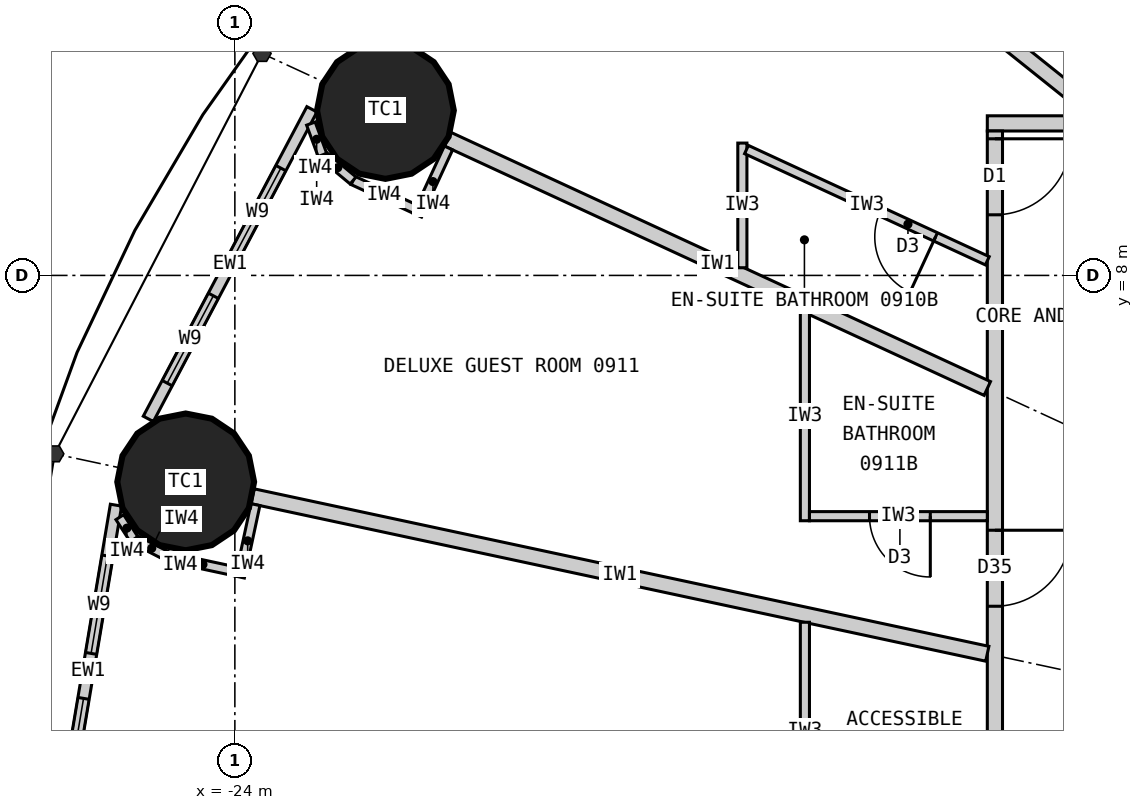
"""IFC4 building model, lengths in metres.
Left out: names, types, materials, properties, quantities, classifications, styles, units other than length and angle.
Written with IfcOpenShell. Run it as: python <this file> out.ifc"""

import sys

from ifc_helpers import new_model, si_unit, direction, frame, frame_2d, origin, origin_2d, place, context, subcontext, project, spatial, rectangle, circle, extrude, element, fill, save


model = new_model("IFC4")
c1 = context("Model", 3, precision=1e-05, world=origin(), true_north=direction((0.0, 1.0)))
c2 = subcontext(c1, "Body", "Model", "MODEL_VIEW")
j1 = project(units=[si_unit("LENGTHUNIT", "METRE"), si_unit("PLANEANGLEUNIT", "RADIAN")], contexts=[c1])
p1 = place(None, origin())
s1 = spatial("IfcSite", under=j1, at=p1, CompositionType="ELEMENT")
p2 = place(p1, origin())
s2 = spatial("IfcBuilding", under=s1, at=p2, CompositionType="ELEMENT")
p3 = place(p2, frame((0.0, 0.0, 42.6)))
s3 = spatial("IfcBuildingStorey", under=s2, at=p3, CompositionType="ELEMENT", Elevation=42.6)
for number, where, z_axis, x_axis in (
    (1, (-22.019, 10.17, 0.0), (0.0, 0.0, 1.0), (1.0, 0.0, 0.0)),
    (2, (-24.647, 5.283, 0.0), (0.0, 0.0, 1.0), (1.0, 0.0, 0.0)),
):
    element("IfcColumn", number, at=place(p3, frame(where, z_axis=z_axis, x_axis=x_axis)), inside=s3, PredefinedType="COLUMN", context=c2, shape_type="SweptSolid", body=[
        extrude(circle(Radius=0.9, at=origin_2d()), origin(), (0.0, 0.0, 1.0), 3.3),
    ])
p4 = place(p3, frame((-22.986, 10.185, 0.0), z_axis=(0.0, 0.0, 1.0), x_axis=(-0.467303182954, -0.884097129959, 0.0)))
e3 = element("IfcWall", 3, at=p4, inside=s3, PredefinedType="ELEMENTEDWALL", context=c2, shape_type="SweptSolid", body=[
    extrude(rectangle(XDim=4.606, YDim=0.15, at=frame_2d((2.303, 0.0))), origin(), (0.0, 0.0, 1.0), 3.05),
])
p5 = place(p4, frame((0.875, 0.0, 0.9)))
e4 = element("IfcOpeningElement", 4, at=p5, cuts=e3, PredefinedType="OPENING", context=c2, shape_type="SweptSolid", body=[
    extrude(rectangle(XDim=1.3, YDim=1.9, at=frame_2d((0.65, 0.95))), frame((0.0, 0.085, 0.0), z_axis=(0.0, -1.0, 0.0), x_axis=(1.0, 0.0, 0.0)), (0.0, 0.0, 1.0), 0.17),
])
p6 = place(p4, frame((2.775, 0.0, 0.9)))
e5 = element("IfcOpeningElement", 5, at=p6, cuts=e3, PredefinedType="OPENING", context=c2, shape_type="SweptSolid", body=[
    extrude(rectangle(XDim=1.3, YDim=1.9, at=frame_2d((0.65, 0.95))), frame((0.0, 0.085, 0.0), z_axis=(0.0, -1.0, 0.0), x_axis=(1.0, 0.0, 0.0)), (0.0, 0.0, 1.0), 0.17),
])
p7 = place(p3, frame((-25.564, 4.978, 0.0), z_axis=(0.0, 0.0, 1.0), x_axis=(-0.165641751141, -0.986185991727, 0.0)))
e6 = element("IfcWall", 6, at=p7, inside=s3, PredefinedType="ELEMENTEDWALL", context=c2, shape_type="SweptSolid", body=[
    extrude(rectangle(XDim=4.428, YDim=0.15, at=frame_2d((2.214, 0.0))), origin(), (0.0, 0.0, 1.0), 3.05),
])
p8 = place(p7, frame((0.678, 0.0, 0.9)))
e7 = element("IfcOpeningElement", 7, at=p8, cuts=e6, PredefinedType="OPENING", context=c2, shape_type="SweptSolid", body=[
    extrude(rectangle(XDim=1.3, YDim=1.9, at=frame_2d((0.65, 0.95))), frame((0.0, 0.085, 0.0), z_axis=(0.0, -1.0, 0.0), x_axis=(1.0, 0.0, 0.0)), (0.0, 0.0, 1.0), 0.17),
])
p9 = place(p7, frame((2.578, 0.0, 0.9)))
e8 = element("IfcOpeningElement", 8, at=p9, cuts=e6, PredefinedType="OPENING", context=c2, shape_type="SweptSolid", body=[
    extrude(rectangle(XDim=1.3, YDim=1.9, at=frame_2d((0.65, 0.95))), frame((0.0, 0.085, 0.0), z_axis=(0.0, -1.0, 0.0), x_axis=(1.0, 0.0, 0.0)), (0.0, 0.0, 1.0), 0.17),
])
p10 = place(p3, frame((-14.1, 10.0, 0.0), z_axis=(0.0, 0.0, 1.0), x_axis=(1.0, 0.0, 0.0)))
e9 = element("IfcWall", 9, at=p10, inside=s3, PredefinedType="PARTITIONING", context=c2, shape_type="SweptSolid", body=[
    extrude(rectangle(XDim=28.2, YDim=0.2, at=frame_2d((14.1, 0.0))), origin(), (0.0, 0.0, 1.0), 3.05),
])
p11 = place(p10, frame((23.477, 0.0, 0.0)))
e10 = element("IfcOpeningElement", 10, at=p11, cuts=e9, PredefinedType="OPENING", context=c2, shape_type="SweptSolid", body=[
    extrude(rectangle(XDim=1.0, YDim=2.2, at=frame_2d((0.5, 1.1))), frame((0.0, 0.11, 0.0), z_axis=(0.0, -1.0, 0.0), x_axis=(1.0, 0.0, 0.0)), (0.0, 0.0, 1.0), 0.22),
])
p12 = place(p10, frame((18.529, 0.0, 0.0)))
e11 = element("IfcOpeningElement", 11, at=p12, cuts=e9, PredefinedType="OPENING", context=c2, shape_type="SweptSolid", body=[
    extrude(rectangle(XDim=1.0, YDim=2.2, at=frame_2d((0.5, 1.1))), frame((0.0, 0.11, 0.0), z_axis=(0.0, -1.0, 0.0), x_axis=(1.0, 0.0, 0.0)), (0.0, 0.0, 1.0), 0.22),
])
p13 = place(p10, frame((14.623, 0.0, 0.0)))
e12 = element("IfcOpeningElement", 12, at=p13, cuts=e9, PredefinedType="OPENING", context=c2, shape_type="SweptSolid", body=[
    extrude(rectangle(XDim=1.0, YDim=2.2, at=frame_2d((0.5, 1.1))), frame((0.0, 0.11, 0.0), z_axis=(0.0, -1.0, 0.0), x_axis=(1.0, 0.0, 0.0)), (0.0, 0.0, 1.0), 0.22),
])
p14 = place(p10, frame((11.252, 0.0, 0.0)))
e13 = element("IfcOpeningElement", 13, at=p14, cuts=e9, PredefinedType="OPENING", context=c2, shape_type="SweptSolid", body=[
    extrude(rectangle(XDim=1.0, YDim=2.1, at=frame_2d((0.5, 1.05))), frame((0.0, 0.11, 0.0), z_axis=(0.0, -1.0, 0.0), x_axis=(1.0, 0.0, 0.0)), (0.0, 0.0, 1.0), 0.22),
])
p15 = place(p10, frame((8.671, 0.0, 0.0)))
e14 = element("IfcOpeningElement", 14, at=p15, cuts=e9, PredefinedType="OPENING", context=c2, shape_type="SweptSolid", body=[
    extrude(rectangle(XDim=1.0, YDim=2.2, at=frame_2d((0.5, 1.1))), frame((0.0, 0.11, 0.0), z_axis=(0.0, -1.0, 0.0), x_axis=(1.0, 0.0, 0.0)), (0.0, 0.0, 1.0), 0.22),
])
p16 = place(p10, frame((1.616, 0.0, 0.0)))
e15 = element("IfcOpeningElement", 15, at=p16, cuts=e9, PredefinedType="OPENING", context=c2, shape_type="SweptSolid", body=[
    extrude(rectangle(XDim=1.0, YDim=2.2, at=frame_2d((0.5, 1.1))), frame((0.0, 0.11, 0.0), z_axis=(0.0, -1.0, 0.0), x_axis=(1.0, 0.0, 0.0)), (0.0, 0.0, 1.0), 0.22),
])
p17 = place(p3, frame((-14.0, 9.9, 0.0), z_axis=(0.0, 0.0, 1.0), x_axis=(0.0, -1.0, 0.0)))
e16 = element("IfcWall", 16, at=p17, inside=s3, PredefinedType="PARTITIONING", context=c2, shape_type="SweptSolid", body=[
    extrude(rectangle(XDim=19.8, YDim=0.2, at=frame_2d((9.9, 0.0))), origin(), (0.0, 0.0, 1.0), 3.05),
])
p18 = place(p17, frame((0.103, 0.0, 0.0)))
e17 = element("IfcOpeningElement", 17, at=p18, cuts=e16, PredefinedType="OPENING", context=c2, shape_type="SweptSolid", body=[
    extrude(rectangle(XDim=1.0, YDim=2.2, at=frame_2d((0.5, 1.1))), frame((0.0, 0.11, 0.0), z_axis=(0.0, -1.0, 0.0), x_axis=(1.0, 0.0, 0.0)), (0.0, 0.0, 1.0), 0.22),
])
p19 = place(p17, frame((5.252, 0.0, 0.0)))
e18 = element("IfcOpeningElement", 18, at=p19, cuts=e16, PredefinedType="OPENING", context=c2, shape_type="SweptSolid", body=[
    extrude(rectangle(XDim=1.0, YDim=2.0, at=frame_2d((0.5, 1.0))), frame((0.0, 0.11, 0.0), z_axis=(0.0, -1.0, 0.0), x_axis=(1.0, 0.0, 0.0)), (0.0, 0.0, 1.0), 0.22),
])
p20 = place(p17, frame((10.117, 0.0, 0.0)))
e19 = element("IfcOpeningElement", 19, at=p20, cuts=e16, PredefinedType="OPENING", context=c2, shape_type="SweptSolid", body=[
    extrude(rectangle(XDim=1.0, YDim=2.2, at=frame_2d((0.5, 1.1))), frame((0.0, 0.11, 0.0), z_axis=(0.0, -1.0, 0.0), x_axis=(1.0, 0.0, 0.0)), (0.0, 0.0, 1.0), 0.22),
])
p21 = place(p17, frame((13.247, 0.0, 0.0)))
e20 = element("IfcOpeningElement", 20, at=p21, cuts=e16, PredefinedType="OPENING", context=c2, shape_type="SweptSolid", body=[
    extrude(rectangle(XDim=1.0, YDim=2.0, at=frame_2d((0.5, 1.0))), frame((0.0, 0.11, 0.0), z_axis=(0.0, -1.0, 0.0), x_axis=(1.0, 0.0, 0.0)), (0.0, 0.0, 1.0), 0.22),
])
p22 = place(p17, frame((15.679, 0.0, 0.0)))
e21 = element("IfcOpeningElement", 21, at=p22, cuts=e16, PredefinedType="OPENING", context=c2, shape_type="SweptSolid", body=[
    extrude(rectangle(XDim=1.0, YDim=2.2, at=frame_2d((0.5, 1.1))), frame((0.0, 0.11, 0.0), z_axis=(0.0, -1.0, 0.0), x_axis=(1.0, 0.0, 0.0)), (0.0, 0.0, 1.0), 0.22),
])
p23 = place(p3, frame((-12.625, 10.1, 0.0), z_axis=(0.0, 0.0, 1.0), x_axis=(-0.780872884676, 0.624689953479, 0.0)))
e22 = element("IfcWall", 22, at=p23, inside=s3, PredefinedType="PARTITIONING", context=c2, shape_type="SweptSolid", body=[
    extrude(rectangle(XDim=5.845, YDim=0.2, at=frame_2d((2.922, 0.0))), origin(), (0.0, 0.0, 1.0), 2.15),
])
p24 = place(p3, frame((-14.1, 6.512, 0.0), z_axis=(0.0, 0.0, 1.0), x_axis=(-0.907842433118, 0.41931147925, 0.0)))
e23 = element("IfcWall", 23, at=p24, inside=s3, PredefinedType="PARTITIONING", context=c2, shape_type="SweptSolid", body=[
    extrude(rectangle(XDim=7.823, YDim=0.2, at=frame_2d((3.912, 0.0))), origin(), (0.0, 0.0, 1.0), 2.15),
])
p25 = place(p3, frame((-14.1, 3.022, 0.0), z_axis=(0.0, 0.0, 1.0), x_axis=(-0.977786510688, 0.209603290805, 0.0)))
e24 = element("IfcWall", 24, at=p25, inside=s3, PredefinedType="PARTITIONING", context=c2, shape_type="SweptSolid", body=[
    extrude(rectangle(XDim=9.887, YDim=0.2, at=frame_2d((4.943, 0.0))), origin(), (0.0, 0.0, 1.0), 2.05),
])
p26 = place(p3, frame((-17.323, 8.101, 0.0), z_axis=(0.0, 0.0, 1.0), x_axis=(0.0, 1.0, 0.0)))
e25 = element("IfcWall", 25, at=p26, inside=s3, PredefinedType="PARTITIONING", context=c2, shape_type="SweptSolid", body=[
    extrude(rectangle(XDim=1.64, YDim=0.12, at=frame_2d((0.82, 0.0))), origin(), (0.0, 0.0, 1.0), 3.05),
])
p27 = place(p3, frame((-14.1, 8.193, 0.0), z_axis=(0.0, 0.0, 1.0), x_axis=(-0.907836493557, 0.419324338628, 0.0)))
e26 = element("IfcWall", 26, at=p27, inside=s3, PredefinedType="PARTITIONING", context=c2, shape_type="SweptSolid", body=[
    extrude(rectangle(XDim=3.49, YDim=0.12, at=frame_2d((1.745, 0.0))), origin(), (0.0, 0.0, 1.0), 3.05),
])
p28 = place(p27, frame((0.75, 0.0, 0.0)))
e27 = element("IfcOpeningElement", 27, at=p28, cuts=e26, PredefinedType="OPENING", context=c2, shape_type="SweptSolid", body=[
    extrude(rectangle(XDim=0.8, YDim=2.1, at=frame_2d((0.4, 1.05))), frame((0.0, 0.07, 0.0), z_axis=(0.0, -1.0, 0.0), x_axis=(1.0, 0.0, 0.0)), (0.0, 0.0, 1.0), 0.14),
])
p29 = place(p3, frame((-16.5, 7.521, 0.0), z_axis=(0.0, 0.0, 1.0), x_axis=(0.0, -1.0, 0.0)))
e28 = element("IfcWall", 28, at=p29, inside=s3, PredefinedType="PARTITIONING", context=c2, shape_type="SweptSolid", body=[
    extrude(rectangle(XDim=2.749, YDim=0.12, at=frame_2d((1.374, 0.0))), origin(), (0.0, 0.0, 1.0), 3.05),
])
p30 = place(p3, frame((-14.1, 4.833, 0.0), z_axis=(0.0, 0.0, 1.0), x_axis=(-1.0, 0.0, 0.0)))
e29 = element("IfcWall", 29, at=p30, inside=s3, PredefinedType="PARTITIONING", context=c2, shape_type="SweptSolid", body=[
    extrude(rectangle(XDim=2.34, YDim=0.12, at=frame_2d((1.17, 0.0))), origin(), (0.0, 0.0, 1.0), 3.05),
])
p31 = place(p30, frame((0.75, 0.0, 0.0)))
e30 = element("IfcOpeningElement", 30, at=p31, cuts=e29, PredefinedType="OPENING", context=c2, shape_type="SweptSolid", body=[
    extrude(rectangle(XDim=0.8, YDim=2.1, at=frame_2d((0.4, 1.05))), frame((0.0, 0.07, 0.0), z_axis=(0.0, -1.0, 0.0), x_axis=(1.0, 0.0, 0.0)), (0.0, 0.0, 1.0), 0.14),
])
p32 = place(p3, frame((-16.5, 3.437, 0.0), z_axis=(0.0, 0.0, 1.0), x_axis=(0.0, -1.0, 0.0)))
e31 = element("IfcWall", 31, at=p32, inside=s3, PredefinedType="PARTITIONING", context=c2, shape_type="SweptSolid", body=[
    extrude(rectangle(XDim=2.854, YDim=0.12, at=frame_2d((1.427, 0.0))), origin(), (0.0, 0.0, 1.0), 3.05),
])
p33 = place(p3, frame((-21.189, 9.677, 0.0), z_axis=(0.0, 0.0, 1.0), x_axis=(-0.419344098106, -0.907827366509, 0.0)))
e32 = element("IfcWall", 32, at=p33, inside=s3, PredefinedType="PARTITIONING", context=c2, shape_type="SweptSolid", body=[
    extrude(rectangle(XDim=0.975, YDim=0.12, at=frame_2d((0.487, 0.0))), origin(), (0.0, 0.0, 1.0), 3.05),
])
p34 = place(p3, frame((-21.627, 8.872, 0.0), z_axis=(0.0, 0.0, 1.0), x_axis=(-0.907935564339, 0.419109783957, 0.0)))
e33 = element("IfcWall", 33, at=p34, inside=s3, PredefinedType="PARTITIONING", context=c2, shape_type="SweptSolid", body=[
    extrude(rectangle(XDim=0.9, YDim=0.12, at=frame_2d((0.45, 0.0))), origin(), (0.0, 0.0, 1.0), 3.05),
])
p35 = place(p3, frame((-22.445, 9.249, 0.0), z_axis=(0.0, 0.0, 1.0), x_axis=(-0.768335565584, 0.640047231584, 0.0)))
e34 = element("IfcWall", 34, at=p35, inside=s3, PredefinedType="PARTITIONING", context=c2, shape_type="SweptSolid", body=[
    extrude(rectangle(XDim=0.525, YDim=0.12, at=frame_2d((0.263, 0.0))), origin(), (0.0, 0.0, 1.0), 3.05),
])
p36 = place(p3, frame((-22.848, 9.585, 0.0), z_axis=(0.0, 0.0, 1.0), x_axis=(-0.345267312673, 0.938504386138, 0.0)))
e35 = element("IfcWall", 35, at=p36, inside=s3, PredefinedType="PARTITIONING", context=c2, shape_type="SweptSolid", body=[
    extrude(rectangle(XDim=0.439, YDim=0.12, at=frame_2d((0.22, 0.0))), origin(), (0.0, 0.0, 1.0), 3.05),
])
p37 = place(p3, frame((-23.729, 4.984, 0.0), z_axis=(0.0, 0.0, 1.0), x_axis=(-0.20968306268, -0.977769406979, 0.0)))
e36 = element("IfcWall", 36, at=p37, inside=s3, PredefinedType="PARTITIONING", context=c2, shape_type="SweptSolid", body=[
    extrude(rectangle(XDim=0.975, YDim=0.12, at=frame_2d((0.487, 0.0))), origin(), (0.0, 0.0, 1.0), 3.05),
])
p38 = place(p3, frame((-23.98, 4.103, 0.0), z_axis=(0.0, 0.0, 1.0), x_axis=(-0.977762694187, 0.209714362543, 0.0)))
e37 = element("IfcWall", 37, at=p38, inside=s3, PredefinedType="PARTITIONING", context=c2, shape_type="SweptSolid", body=[
    extrude(rectangle(XDim=0.9, YDim=0.12, at=frame_2d((0.45, 0.0))), origin(), (0.0, 0.0, 1.0), 3.05),
])
p39 = place(p3, frame((-24.86, 4.291, 0.0), z_axis=(0.0, 0.0, 1.0), x_axis=(-0.890204323062, 0.455561481254, 0.0)))
e38 = element("IfcWall", 38, at=p39, inside=s3, PredefinedType="PARTITIONING", context=c2, shape_type="SweptSolid", body=[
    extrude(rectangle(XDim=0.525, YDim=0.12, at=frame_2d((0.263, 0.0))), origin(), (0.0, 0.0, 1.0), 3.05),
])
p40 = place(p3, frame((-25.327, 4.531, 0.0), z_axis=(0.0, 0.0, 1.0), x_axis=(-0.543516034791, 0.839398784801, 0.0)))
e39 = element("IfcWall", 39, at=p40, inside=s3, PredefinedType="PARTITIONING", context=c2, shape_type="SweptSolid", body=[
    extrude(rectangle(XDim=0.344, YDim=0.12, at=frame_2d((0.172, 0.0))), origin(), (0.0, 0.0, 1.0), 3.05),
])
p41 = place(p5, origin())
e40 = element("IfcWindow", 40, at=p41, inside=s3, PartitioningType="SINGLE_PANEL", PredefinedType="WINDOW", context=c2, shape_type="SweptSolid", body=[
    extrude(rectangle(XDim=1.3, YDim=1.9, at=frame_2d((0.65, 0.95))), frame((0.0, 0.03, 0.0), z_axis=(0.0, -1.0, 0.0), x_axis=(1.0, 0.0, 0.0)), (0.0, 0.0, 1.0), 0.06),
])
fill(e4, e40)
p42 = place(p6, origin())
e41 = element("IfcWindow", 41, at=p42, inside=s3, PartitioningType="SINGLE_PANEL", PredefinedType="WINDOW", context=c2, shape_type="SweptSolid", body=[
    extrude(rectangle(XDim=1.3, YDim=1.9, at=frame_2d((0.65, 0.95))), frame((0.0, 0.03, 0.0), z_axis=(0.0, -1.0, 0.0), x_axis=(1.0, 0.0, 0.0)), (0.0, 0.0, 1.0), 0.06),
])
fill(e5, e41)
p43 = place(p8, origin())
e42 = element("IfcWindow", 42, at=p43, inside=s3, PartitioningType="SINGLE_PANEL", PredefinedType="WINDOW", context=c2, shape_type="SweptSolid", body=[
    extrude(rectangle(XDim=1.3, YDim=1.9, at=frame_2d((0.65, 0.95))), frame((0.0, 0.03, 0.0), z_axis=(0.0, -1.0, 0.0), x_axis=(1.0, 0.0, 0.0)), (0.0, 0.0, 1.0), 0.06),
])
fill(e7, e42)
p44 = place(p9, origin())
e43 = element("IfcWindow", 43, at=p44, inside=s3, PartitioningType="SINGLE_PANEL", PredefinedType="WINDOW", context=c2, shape_type="SweptSolid", body=[
    extrude(rectangle(XDim=1.3, YDim=1.9, at=frame_2d((0.65, 0.95))), frame((0.0, 0.03, 0.0), z_axis=(0.0, -1.0, 0.0), x_axis=(1.0, 0.0, 0.0)), (0.0, 0.0, 1.0), 0.06),
])
fill(e8, e43)
p45 = place(p28, origin())
e44 = element("IfcDoor", 44, at=p45, inside=s3, OperationType="SINGLE_SWING_LEFT", PredefinedType="DOOR", context=c2, shape_type="SweptSolid", body=[
    extrude(rectangle(XDim=0.8, YDim=2.1, at=frame_2d((0.4, 1.05))), frame((0.0, 0.025, 0.0), z_axis=(0.0, -1.0, 0.0), x_axis=(1.0, 0.0, 0.0)), (0.0, 0.0, 1.0), 0.05),
])
fill(e27, e44)
p46 = place(p18, origin())
e45 = element("IfcDoor", 45, at=p46, inside=s3, OperationType="SINGLE_SWING_LEFT", PredefinedType="DOOR", context=c2, shape_type="SweptSolid", body=[
    extrude(rectangle(XDim=1.0, YDim=2.2, at=frame_2d((0.5, 1.1))), frame((0.0, 0.025, 0.0), z_axis=(0.0, -1.0, 0.0), x_axis=(1.0, 0.0, 0.0)), (0.0, 0.0, 1.0), 0.05),
])
fill(e17, e45)
p47 = place(p31, origin())
e46 = element("IfcDoor", 46, at=p47, inside=s3, OperationType="SINGLE_SWING_LEFT", PredefinedType="DOOR", context=c2, shape_type="SweptSolid", body=[
    extrude(rectangle(XDim=0.8, YDim=2.1, at=frame_2d((0.4, 1.05))), frame((0.0, 0.025, 0.0), z_axis=(0.0, -1.0, 0.0), x_axis=(1.0, 0.0, 0.0)), (0.0, 0.0, 1.0), 0.05),
])
fill(e30, e46)
p48 = place(p19, origin())
e47 = element("IfcDoor", 47, at=p48, inside=s3, OperationType="SINGLE_SWING_LEFT", PredefinedType="DOOR", context=c2, shape_type="SweptSolid", body=[
    extrude(rectangle(XDim=1.0, YDim=2.0, at=frame_2d((0.5, 1.0))), frame((0.0, 0.025, 0.0), z_axis=(0.0, -1.0, 0.0), x_axis=(1.0, 0.0, 0.0)), (0.0, 0.0, 1.0), 0.05),
])
fill(e18, e47)
save(model, sys.argv[1])
